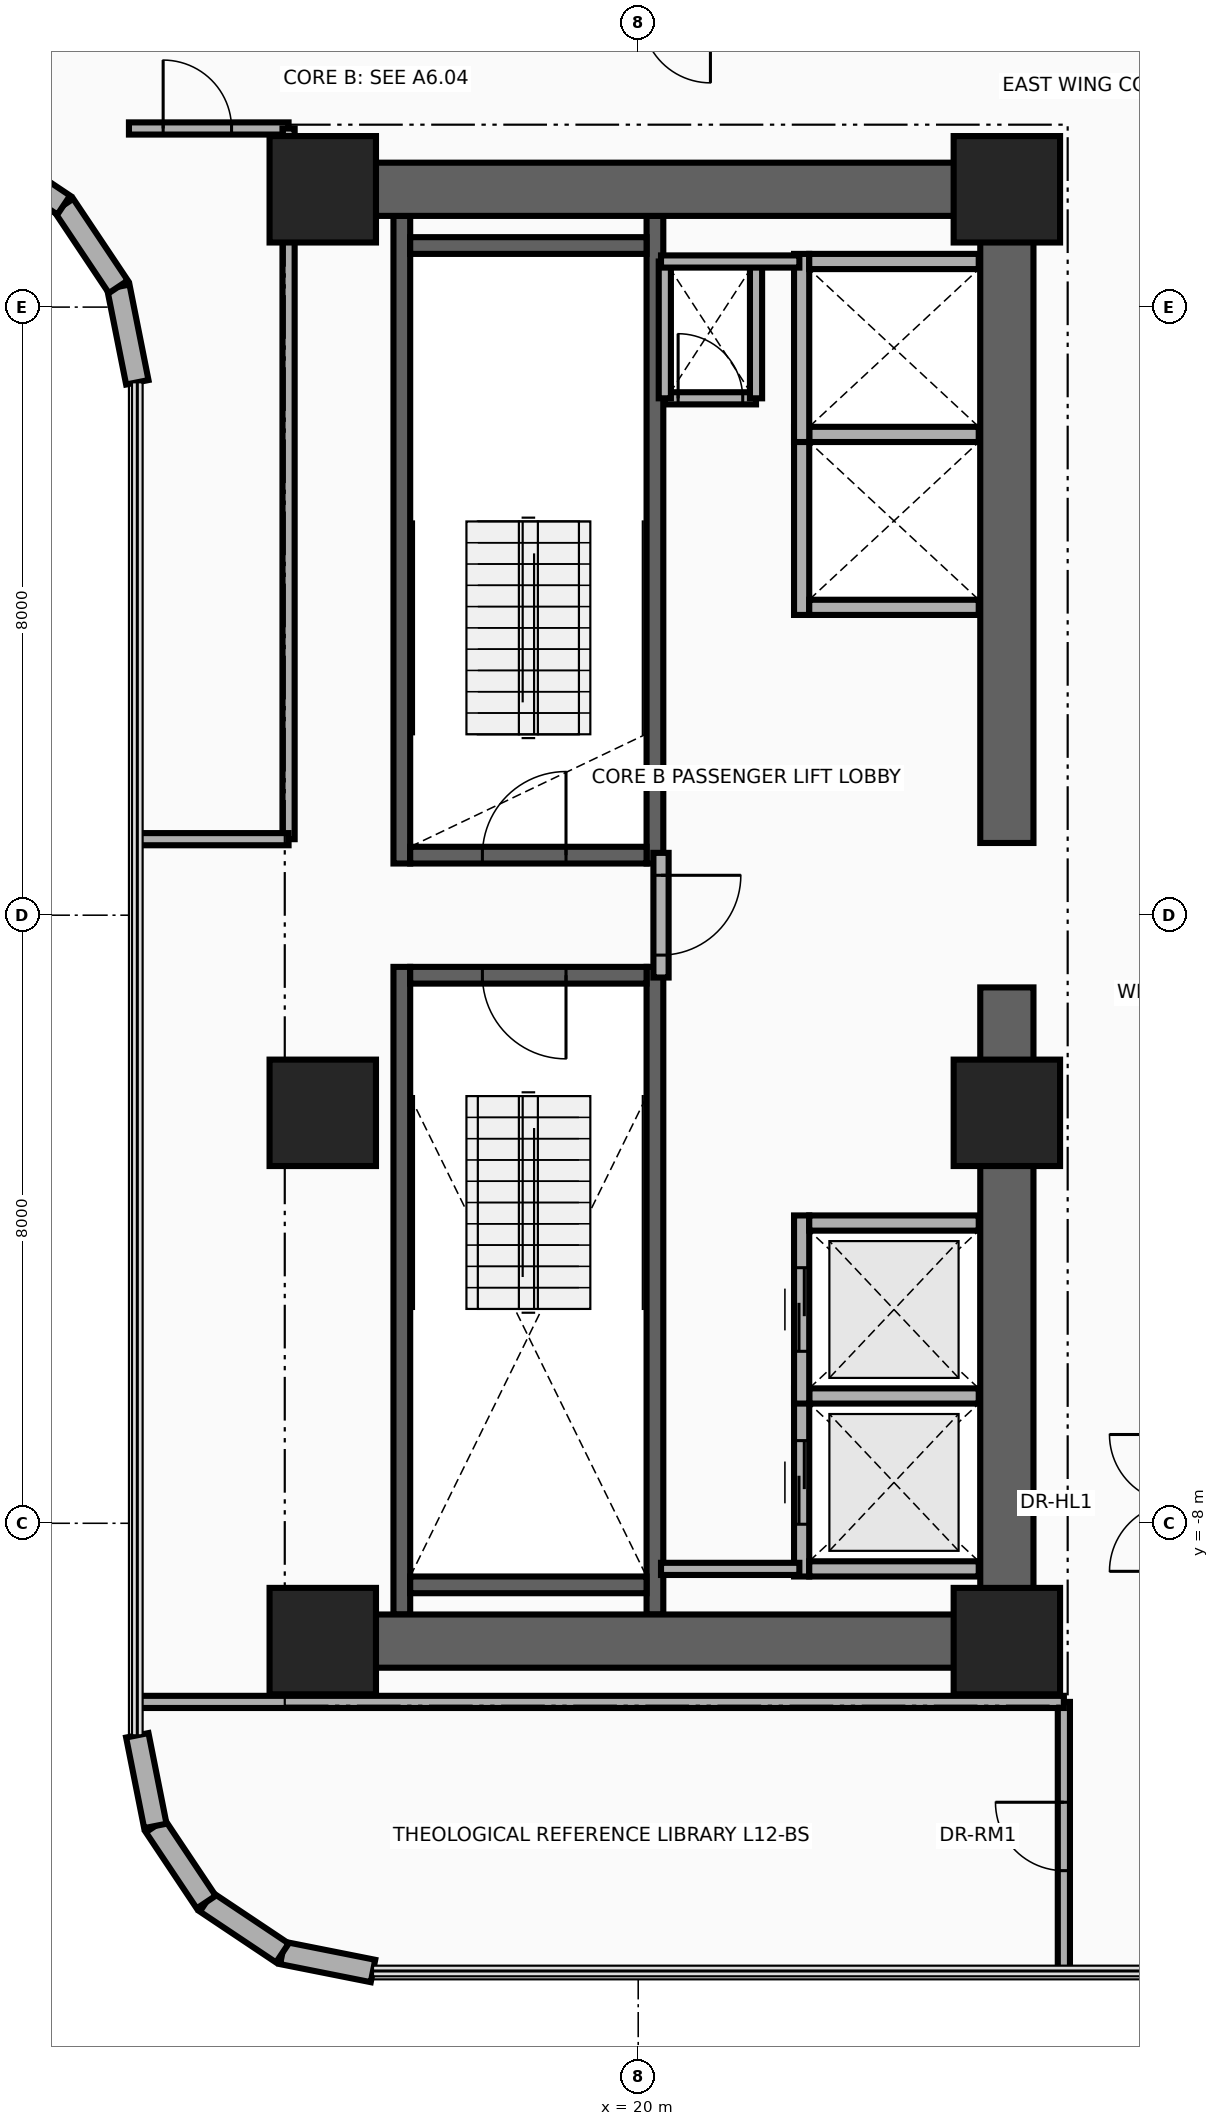
"""IFC4 building model, lengths in metres.
Left out: names, types, materials, properties, quantities, classifications, styles, units other than length and angle.
Written with IfcOpenShell. Run it as: python <this file> out.ifc"""

import sys

from ifc_helpers import new_model, si_unit, direction, frame, frame_2d, origin, origin_2d, place, context, subcontext, project, spatial, rectangle, extrude, source, transform, mapped, element, fill, save


model = new_model("IFC4")
c1 = context("Model", 3, precision=1e-05, world=origin(), true_north=direction((0.0, 1.0)))
c2 = subcontext(c1, "Body", "Model", "MODEL_VIEW")
j1 = project(units=[si_unit("LENGTHUNIT", "METRE"), si_unit("PLANEANGLEUNIT", "RADIAN")], contexts=[c1])
p1 = place(None, origin())
s1 = spatial("IfcSite", under=j1, at=p1, CompositionType="ELEMENT")
p2 = place(p1, origin())
s2 = spatial("IfcBuilding", under=s1, at=p2, CompositionType="ELEMENT")
p3 = place(p2, frame((0.0, 0.0, 51.9)))
s3 = spatial("IfcBuildingStorey", under=s2, at=p3, CompositionType="ELEMENT", Elevation=51.9)
for number, where, z_axis, x_axis in (
    (1, (16.89, 0.68, 0.0), (0.0, 0.0, 1.0), (0.0, 1.0, 0.0)),
    (2, (20.22, 0.68, 0.0), (0.0, 0.0, 1.0), (0.0, 1.0, 0.0)),
):
    element("IfcWall", number, at=place(p3, frame(where, z_axis=z_axis, x_axis=x_axis)), inside=s3, PredefinedType="SHEAR", context=c2, shape_type="SweptSolid", body=[
        extrude(rectangle(XDim=8.52, YDim=0.22, at=frame_2d((4.26, 0.0))), origin(), (0.0, 0.0, 1.0), 3.46),
    ])
p4 = place(p3, frame((17.0, 0.79, 0.0), z_axis=(0.0, 0.0, 1.0), x_axis=(1.0, 0.0, 0.0)))
e3 = element("IfcWall", 3, at=p4, inside=s3, PredefinedType="SHEAR", context=c2, shape_type="SweptSolid", body=[
    extrude(rectangle(XDim=3.11, YDim=0.22, at=frame_2d((1.555, 0.0))), origin(), (0.0, 0.0, 1.0), 3.46),
])
p5 = place(p4, frame((0.95, 0.0, 0.0)))
e4 = element("IfcOpeningElement", 4, at=p5, cuts=e3, PredefinedType="OPENING", context=c2, shape_type="SweptSolid", body=[
    extrude(rectangle(XDim=1.1, YDim=2.15, at=frame_2d((0.55, 1.075))), frame((0.0, 0.125, 0.0), z_axis=(0.0, -1.0, 0.0), x_axis=(1.0, 0.0, 0.0)), (0.0, 0.0, 1.0), 0.25),
])
p6 = place(p3, frame((17.0, 8.81, 0.0), z_axis=(0.0, 0.0, 1.0), x_axis=(1.0, 0.0, 0.0)))
e5 = element("IfcWall", 5, at=p6, inside=s3, PredefinedType="SHEAR", context=c2, shape_type="SweptSolid", body=[
    extrude(rectangle(XDim=3.11, YDim=0.22, at=frame_2d((1.555, 0.0))), origin(), (0.0, 0.0, 1.0), 3.46),
])
for number, where, z_axis, x_axis in (
    (6, (16.89, -9.2, 0.0), (0.0, 0.0, 1.0), (0.0, 1.0, 0.0)),
    (7, (20.22, -9.2, 0.0), (0.0, 0.0, 1.0), (0.0, 1.0, 0.0)),
):
    element("IfcWall", number, at=place(p3, frame(where, z_axis=z_axis, x_axis=x_axis)), inside=s3, PredefinedType="SHEAR", context=c2, shape_type="SweptSolid", body=[
        extrude(rectangle(XDim=8.52, YDim=0.22, at=frame_2d((4.26, 0.0))), origin(), (0.0, 0.0, 1.0), 3.46),
    ])
p7 = place(p3, frame((17.0, -8.81, 0.0), z_axis=(0.0, 0.0, 1.0), x_axis=(1.0, 0.0, 0.0)))
e8 = element("IfcWall", 8, at=p7, inside=s3, PredefinedType="SHEAR", context=c2, shape_type="SweptSolid", body=[
    extrude(rectangle(XDim=3.11, YDim=0.22, at=frame_2d((1.555, 0.0))), origin(), (0.0, 0.0, 1.0), 3.46),
])
p8 = place(p3, frame((17.0, -0.79, 0.0), z_axis=(0.0, 0.0, 1.0), x_axis=(1.0, 0.0, 0.0)))
e9 = element("IfcWall", 9, at=p8, inside=s3, PredefinedType="SHEAR", context=c2, shape_type="SweptSolid", body=[
    extrude(rectangle(XDim=3.11, YDim=0.22, at=frame_2d((1.555, 0.0))), origin(), (0.0, 0.0, 1.0), 3.46),
])
p9 = place(p8, frame((0.95, 0.0, 0.0)))
e10 = element("IfcOpeningElement", 10, at=p9, cuts=e9, PredefinedType="OPENING", context=c2, shape_type="SweptSolid", body=[
    extrude(rectangle(XDim=1.1, YDim=2.15, at=frame_2d((0.55, 1.075))), frame((0.0, 0.125, 0.0), z_axis=(0.0, -1.0, 0.0), x_axis=(1.0, 0.0, 0.0)), (0.0, 0.0, 1.0), 0.25),
])
for number, where, z_axis, x_axis in (
    (11, (24.85, -9.9, 0.0), (0.0, 0.0, 1.0), (0.0, 1.0, 0.0)),
    (12, (24.85, 0.95, 0.0), (0.0, 0.0, 1.0), (0.0, 1.0, 0.0)),
):
    element("IfcWall", number, at=place(p3, frame(where, z_axis=z_axis, x_axis=x_axis)), inside=s3, PredefinedType="SHEAR", context=c2, shape_type="SweptSolid", body=[
        extrude(rectangle(XDim=8.95, YDim=0.7, at=frame_2d((4.475, 0.0))), origin(), (0.0, 0.0, 1.0), 3.46),
    ])
for number, where, z_axis, x_axis in (
    (13, (15.85, 9.55, 0.0), (0.0, 0.0, 1.0), (1.0, 0.0, 0.0)),
    (14, (15.85, -9.55, 0.0), (0.0, 0.0, 1.0), (1.0, 0.0, 0.0)),
):
    element("IfcWall", number, at=place(p3, frame(where, z_axis=z_axis, x_axis=x_axis)), inside=s3, PredefinedType="SHEAR", context=c2, shape_type="SweptSolid", body=[
        extrude(rectangle(XDim=9.0, YDim=0.7, at=frame_2d((4.5, 0.0))), origin(), (0.0, 0.0, 1.0), 3.46),
    ])
m1 = source(origin(), c2, "Body", "SweptSolid", [
    extrude(rectangle(XDim=1.4, YDim=1.4, at=origin_2d()), origin(), (0.0, 0.0, 1.0), 3.7),
])
for number, where, z_axis, x_axis in (
    (15, (15.85, -9.55, 0.0), (0.0, 0.0, 1.0), (1.0, 0.0, 0.0)),
    (16, (24.85, -9.55, 0.0), (0.0, 0.0, 1.0), (1.0, 0.0, 0.0)),
    (17, (15.85, -2.6, 0.0), (0.0, 0.0, 1.0), (1.0, 0.0, 0.0)),
    (18, (24.85, -2.6, 0.0), (0.0, 0.0, 1.0), (1.0, 0.0, 0.0)),
    (19, (15.85, 9.55, 0.0), (0.0, 0.0, 1.0), (1.0, 0.0, 0.0)),
    (20, (24.85, 9.55, 0.0), (0.0, 0.0, 1.0), (1.0, 0.0, 0.0)),
):
    element("IfcColumn", number, at=place(p3, frame(where, z_axis=z_axis, x_axis=x_axis)), inside=s3, PredefinedType="COLUMN", context=c2, shape_type="MappedRepresentation", body=[
        mapped(m1, transform((0.0, 0.0, 0.0), x_axis=(1.0, 0.0, 0.0), y_axis=(0.0, 1.0, 0.0), z_axis=(0.0, 0.0, 1.0), scale=1.0)),
    ])
p10 = place(p3, frame((16.511, -13.89, 0.0), z_axis=(0.0, 0.0, 1.0), x_axis=(-0.980804027463, 0.194996050505, 0.0)))
e21 = element("IfcWall", 21, at=p10, inside=s3, PredefinedType="SOLIDWALL", context=c2, shape_type="SweptSolid", body=[
    extrude(rectangle(XDim=1.216, YDim=0.3, at=frame_2d((0.608, 0.0))), origin(), (0.0, 0.0, 1.0), 3.46),
])
for number, where, z_axis, x_axis in (
    (22, (15.318, -13.653, 0.0), (0.0, 0.0, 1.0), (-0.831, 0.556, 0.0)),
    (23, (14.317, -12.983, 0.0), (0.0, 0.0, 1.0), (-0.556, 0.831, 0.0)),
):
    element("IfcWall", number, at=place(p3, frame(where, z_axis=z_axis, x_axis=x_axis)), inside=s3, PredefinedType="SOLIDWALL", context=c2, shape_type="SweptSolid", body=[
        extrude(rectangle(XDim=1.205, YDim=0.3, at=frame_2d((0.603, 0.0))), origin(), (0.0, 0.0, 1.0), 3.46),
    ])
p11 = place(p3, frame((13.647, -11.982, 0.0), z_axis=(0.0, 0.0, 1.0), x_axis=(-0.195189223115, 0.980765602568, 0.0)))
e24 = element("IfcWall", 24, at=p11, inside=s3, PredefinedType="SOLIDWALL", context=c2, shape_type="SweptSolid", body=[
    extrude(rectangle(XDim=1.216, YDim=0.3, at=frame_2d((0.608, 0.0))), origin(), (0.0, 0.0, 1.0), 3.46),
])
p12 = place(p3, frame((13.41, 7.011, 0.0), z_axis=(0.0, 0.0, 1.0), x_axis=(-0.195090163074, 0.980785312019, 0.0)))
e25 = element("IfcWall", 25, at=p12, inside=s3, PredefinedType="SOLIDWALL", context=c2, shape_type="SweptSolid", body=[
    extrude(rectangle(XDim=1.281, YDim=0.3, at=frame_2d((0.641, 0.0))), origin(), (0.0, 0.0, 1.0), 3.46),
])
for number, where, z_axis, x_axis in (
    (26, (13.16, 8.268, 0.0), (0.0, 0.0, 1.0), (-0.556, 0.831, 0.0)),
    (27, (12.442, 9.342, 0.0), (0.0, 0.0, 1.0), (-0.831, 0.556, 0.0)),
):
    element("IfcWall", number, at=place(p3, frame(where, z_axis=z_axis, x_axis=x_axis)), inside=s3, PredefinedType="SOLIDWALL", context=c2, shape_type="SweptSolid", body=[
        extrude(rectangle(XDim=1.292, YDim=0.3, at=frame_2d((0.646, 0.0))), origin(), (0.0, 0.0, 1.0), 3.46),
    ])
p13 = place(p3, frame((22.15, -8.7, 0.0), z_axis=(0.0, 0.0, 1.0), x_axis=(0.0, 1.0, 0.0)))
e28 = element("IfcWall", 28, at=p13, inside=s3, PredefinedType="MOVABLE", context=c2, shape_type="SweptSolid", body=[
    extrude(rectangle(XDim=2.475, YDim=0.2, at=frame_2d((1.237, 0.0))), origin(), (0.0, 0.0, 1.0), 3.46),
])
p14 = place(p13, frame((0.688, 0.0, 0.0)))
e29 = element("IfcOpeningElement", 29, at=p14, cuts=e28, PredefinedType="OPENING", context=c2, shape_type="SweptSolid", body=[
    extrude(rectangle(XDim=1.1, YDim=2.1, at=frame_2d((0.55, 1.05))), frame((0.0, 0.115, 0.0), z_axis=(0.0, -1.0, 0.0), x_axis=(1.0, 0.0, 0.0)), (0.0, 0.0, 1.0), 0.23),
])
for number, where, z_axis, x_axis in (
    (30, (22.25, -8.6, 0.0), (0.0, 0.0, 1.0), (1.0, 0.0, 0.0)),
    (31, (22.25, -6.325, 0.0), (0.0, 0.0, 1.0), (1.0, 0.0, 0.0)),
):
    element("IfcWall", number, at=place(p3, frame(where, z_axis=z_axis, x_axis=x_axis)), inside=s3, PredefinedType="MOVABLE", context=c2, shape_type="SweptSolid", body=[
        extrude(rectangle(XDim=2.23, YDim=0.2, at=frame_2d((1.115, 0.0))), origin(), (0.0, 0.0, 1.0), 3.46),
    ])
p15 = place(p3, frame((22.15, -6.425, 0.0), z_axis=(0.0, 0.0, 1.0), x_axis=(0.0, 1.0, 0.0)))
e32 = element("IfcWall", 32, at=p15, inside=s3, PredefinedType="MOVABLE", context=c2, shape_type="SweptSolid", body=[
    extrude(rectangle(XDim=2.475, YDim=0.2, at=frame_2d((1.238, 0.0))), origin(), (0.0, 0.0, 1.0), 3.46),
])
p16 = place(p15, frame((0.688, 0.0, 0.0)))
e33 = element("IfcOpeningElement", 33, at=p16, cuts=e32, PredefinedType="OPENING", context=c2, shape_type="SweptSolid", body=[
    extrude(rectangle(XDim=1.1, YDim=2.1, at=frame_2d((0.55, 1.05))), frame((0.0, 0.115, 0.0), z_axis=(0.0, -1.0, 0.0), x_axis=(1.0, 0.0, 0.0)), (0.0, 0.0, 1.0), 0.23),
])
p17 = place(p3, frame((22.25, -4.05, 0.0), z_axis=(0.0, 0.0, 1.0), x_axis=(1.0, 0.0, 0.0)))
e34 = element("IfcWall", 34, at=p17, inside=s3, PredefinedType="MOVABLE", context=c2, shape_type="SweptSolid", body=[
    extrude(rectangle(XDim=2.23, YDim=0.2, at=frame_2d((1.115, 0.0))), origin(), (0.0, 0.0, 1.0), 3.46),
])
p18 = place(p3, frame((22.15, 3.95, 0.0), z_axis=(0.0, 0.0, 1.0), x_axis=(0.0, 1.0, 0.0)))
e35 = element("IfcWall", 35, at=p18, inside=s3, PredefinedType="MOVABLE", context=c2, shape_type="SweptSolid", body=[
    extrude(rectangle(XDim=2.475, YDim=0.2, at=frame_2d((1.238, 0.0))), origin(), (0.0, 0.0, 1.0), 3.46),
])
for number, where, z_axis, x_axis in (
    (36, (22.25, 4.05, 0.0), (0.0, 0.0, 1.0), (1.0, 0.0, 0.0)),
    (37, (22.25, 6.325, 0.0), (0.0, 0.0, 1.0), (1.0, 0.0, 0.0)),
):
    element("IfcWall", number, at=place(p3, frame(where, z_axis=z_axis, x_axis=x_axis)), inside=s3, PredefinedType="MOVABLE", context=c2, shape_type="SweptSolid", body=[
        extrude(rectangle(XDim=2.23, YDim=0.2, at=frame_2d((1.115, 0.0))), origin(), (0.0, 0.0, 1.0), 2.245),
    ])
p19 = place(p3, frame((22.15, 6.225, 0.0), z_axis=(0.0, 0.0, 1.0), x_axis=(0.0, 1.0, 0.0)))
e38 = element("IfcWall", 38, at=p19, inside=s3, PredefinedType="MOVABLE", context=c2, shape_type="SweptSolid", body=[
    extrude(rectangle(XDim=2.475, YDim=0.2, at=frame_2d((1.237, 0.0))), origin(), (0.0, 0.0, 1.0), 3.46),
])
p20 = place(p3, frame((22.25, 8.6, 0.0), z_axis=(0.0, 0.0, 1.0), x_axis=(1.0, 0.0, 0.0)))
e39 = element("IfcWall", 39, at=p20, inside=s3, PredefinedType="MOVABLE", context=c2, shape_type="SweptSolid", body=[
    extrude(rectangle(XDim=2.23, YDim=0.2, at=frame_2d((1.115, 0.0))), origin(), (0.0, 0.0, 1.0), 2.245),
])
p21 = place(p3, frame((20.3, -0.82, 0.0), z_axis=(0.0, 0.0, 1.0), x_axis=(0.0, 1.0, 0.0)))
e40 = element("IfcWall", 40, at=p21, inside=s3, PredefinedType="PARTITIONING", context=c2, shape_type="SweptSolid", body=[
    extrude(rectangle(XDim=1.64, YDim=0.2, at=frame_2d((0.82, 0.0))), origin(), (0.0, 0.0, 1.0), 3.46),
])
p22 = place(p21, frame((0.295, 0.0, 0.0)))
e41 = element("IfcOpeningElement", 41, at=p22, cuts=e40, PredefinedType="OPENING", context=c2, shape_type="SweptSolid", body=[
    extrude(rectangle(XDim=1.05, YDim=2.15, at=frame_2d((0.525, 1.075))), frame((0.0, 0.115, 0.0), z_axis=(0.0, -1.0, 0.0), x_axis=(1.0, 0.0, 0.0)), (0.0, 0.0, 1.0), 0.23),
])
p23 = place(p3, frame((20.35, 6.8, 0.0), z_axis=(0.0, 0.0, 1.0), x_axis=(1.0, 0.0, 0.0)))
e42 = element("IfcWall", 42, at=p23, inside=s3, PredefinedType="PARTITIONING", context=c2, shape_type="SweptSolid", body=[
    extrude(rectangle(XDim=1.2, YDim=0.16, at=frame_2d((0.6, 0.0))), origin(), (0.0, 0.0, 1.0), 3.46),
])
p24 = place(p23, frame((0.175, 0.0, 0.0)))
e43 = element("IfcOpeningElement", 43, at=p24, cuts=e42, PredefinedType="OPENING", context=c2, shape_type="SweptSolid", body=[
    extrude(rectangle(XDim=0.85, YDim=2.05, at=frame_2d((0.425, 1.025))), frame((0.0, 0.095, 0.0), z_axis=(0.0, -1.0, 0.0), x_axis=(1.0, 0.0, 0.0)), (0.0, 0.0, 1.0), 0.19),
])
for number, where, z_axis, x_axis in (
    (44, (21.55, 6.8, 0.0), (0.0, 0.0, 1.0), (0.0, 1.0, 0.0)),
    (45, (20.35, 6.8, 0.0), (0.0, 0.0, 1.0), (0.0, 1.0, 0.0)),
):
    element("IfcWall", number, at=place(p3, frame(where, z_axis=z_axis, x_axis=x_axis)), inside=s3, PredefinedType="PARTITIONING", context=c2, shape_type="SweptSolid", body=[
        extrude(rectangle(XDim=1.8, YDim=0.16, at=frame_2d((0.9, 0.0))), origin(), (0.0, 0.0, 1.0), 3.46),
    ])
for number, where, z_axis, x_axis in (
    (46, (20.3, -8.6, 0.0), (0.0, 0.0, 1.0), (1.0, 0.0, 0.0)),
    (47, (20.3, 8.6, 0.0), (0.0, 0.0, 1.0), (1.0, 0.0, 0.0)),
):
    element("IfcWall", number, at=place(p3, frame(where, z_axis=z_axis, x_axis=x_axis)), inside=s3, PredefinedType="PARTITIONING", context=c2, shape_type="SweptSolid", body=[
        extrude(rectangle(XDim=1.82, YDim=0.16, at=frame_2d((0.91, 0.0))), origin(), (0.0, 0.0, 1.0), 3.46),
    ])
p25 = place(p3, frame((25.6, -13.89, 0.0), z_axis=(0.0, 0.0, 1.0), x_axis=(0.0, 1.0, 0.0)))
e48 = element("IfcWall", 48, at=p25, inside=s3, PredefinedType="PARTITIONING", context=c2, shape_type="SweptSolid", body=[
    extrude(rectangle(XDim=3.54, YDim=0.16, at=frame_2d((1.77, 0.0))), origin(), (0.0, 0.0, 1.0), 3.46),
])
p26 = place(p25, frame((1.32, 0.0, 0.0)))
e49 = element("IfcOpeningElement", 49, at=p26, cuts=e48, PredefinedType="OPENING", context=c2, shape_type="SweptSolid", body=[
    extrude(rectangle(XDim=0.9, YDim=2.1, at=frame_2d((0.45, 1.05))), frame((0.0, 0.095, 0.0), z_axis=(0.0, -1.0, 0.0), x_axis=(1.0, 0.0, 0.0)), (0.0, 0.0, 1.0), 0.19),
])
p27 = place(p3, frame((13.41, -10.35, 0.0), z_axis=(0.0, 0.0, 1.0), x_axis=(1.0, 0.0, 0.0)))
e50 = element("IfcWall", 50, at=p27, inside=s3, PredefinedType="PARTITIONING", context=c2, shape_type="SweptSolid", body=[
    extrude(rectangle(XDim=12.19, YDim=0.16, at=frame_2d((6.095, 0.0))), origin(), (0.0, 0.0, 1.0), 3.46),
])
p28 = place(p3, frame((13.3, 10.35, 0.0), z_axis=(0.0, 0.0, 1.0), x_axis=(1.0, 0.0, 0.0)))
e51 = element("IfcWall", 51, at=p28, inside=s3, PredefinedType="PARTITIONING", context=c2, shape_type="SweptSolid", body=[
    extrude(rectangle(XDim=2.1, YDim=0.16, at=frame_2d((1.05, 0.0))), origin(), (0.0, 0.0, 1.0), 2.583),
])
p29 = place(p28, frame((0.45, 0.0, 0.0)))
e52 = element("IfcOpeningElement", 52, at=p29, cuts=e51, PredefinedType="OPENING", context=c2, shape_type="SweptSolid", body=[
    extrude(rectangle(XDim=0.9, YDim=2.1, at=frame_2d((0.45, 1.05))), frame((0.0, 0.095, 0.0), z_axis=(0.0, -1.0, 0.0), x_axis=(1.0, 0.0, 0.0)), (0.0, 0.0, 1.0), 0.19),
])
p30 = place(p3, frame((15.4, 1.0, 0.0), z_axis=(0.0, 0.0, 1.0), x_axis=(0.0, 1.0, 0.0)))
e53 = element("IfcWall", 53, at=p30, inside=s3, PredefinedType="PARTITIONING", context=c2, shape_type="SweptSolid", body=[
    extrude(rectangle(XDim=9.35, YDim=0.16, at=frame_2d((4.675, 0.0))), origin(), (0.0, 0.0, 1.0), 2.245),
])
p31 = place(p3, frame((13.41, 1.0, 0.0), z_axis=(0.0, 0.0, 1.0), x_axis=(1.0, 0.0, 0.0)))
e54 = element("IfcWall", 54, at=p31, inside=s3, PredefinedType="PARTITIONING", context=c2, shape_type="SweptSolid", body=[
    extrude(rectangle(XDim=1.99, YDim=0.16, at=frame_2d((0.995, 0.0))), origin(), (0.0, 0.0, 1.0), 2.245),
])
p32 = place(p14, origin())
e55 = element("IfcDoor", 55, at=p32, inside=s3, OperationType="DOUBLE_DOOR_SLIDING", PredefinedType="DOOR", context=c2, shape_type="SweptSolid", body=[
    extrude(rectangle(XDim=1.1, YDim=2.1, at=frame_2d((0.55, 1.05))), frame((0.0, 0.025, 0.0), z_axis=(0.0, -1.0, 0.0), x_axis=(1.0, 0.0, 0.0)), (0.0, 0.0, 1.0), 0.05),
])
fill(e29, e55)
p33 = place(p16, origin())
e56 = element("IfcDoor", 56, at=p33, inside=s3, OperationType="DOUBLE_DOOR_SLIDING", PredefinedType="DOOR", context=c2, shape_type="SweptSolid", body=[
    extrude(rectangle(XDim=1.1, YDim=2.1, at=frame_2d((0.55, 1.05))), frame((0.0, 0.025, 0.0), z_axis=(0.0, -1.0, 0.0), x_axis=(1.0, 0.0, 0.0)), (0.0, 0.0, 1.0), 0.05),
])
fill(e33, e56)
p34 = place(p22, frame((1.05, 0.0, 0.0), z_axis=(0.0, 0.0, 1.0), x_axis=(-1.0, 0.0, 0.0)))
e57 = element("IfcDoor", 57, at=p34, inside=s3, OperationType="SINGLE_SWING_LEFT", PredefinedType="DOOR", context=c2, shape_type="SweptSolid", body=[
    extrude(rectangle(XDim=1.05, YDim=2.15, at=frame_2d((0.525, 1.075))), frame((0.0, 0.025, 0.0), z_axis=(0.0, -1.0, 0.0), x_axis=(1.0, 0.0, 0.0)), (0.0, 0.0, 1.0), 0.05),
])
fill(e41, e57)
p35 = place(p5, origin())
e58 = element("IfcDoor", 58, at=p35, inside=s3, OperationType="SINGLE_SWING_RIGHT", PredefinedType="DOOR", context=c2, shape_type="SweptSolid", body=[
    extrude(rectangle(XDim=1.1, YDim=2.15, at=frame_2d((0.55, 1.075))), frame((0.0, 0.025, 0.0), z_axis=(0.0, -1.0, 0.0), x_axis=(1.0, 0.0, 0.0)), (0.0, 0.0, 1.0), 0.05),
])
fill(e4, e58)
p36 = place(p9, frame((1.1, 0.0, 0.0), z_axis=(0.0, 0.0, 1.0), x_axis=(-1.0, 0.0, 0.0)))
e59 = element("IfcDoor", 59, at=p36, inside=s3, OperationType="SINGLE_SWING_LEFT", PredefinedType="DOOR", context=c2, shape_type="SweptSolid", body=[
    extrude(rectangle(XDim=1.1, YDim=2.15, at=frame_2d((0.55, 1.075))), frame((0.0, 0.025, 0.0), z_axis=(0.0, -1.0, 0.0), x_axis=(1.0, 0.0, 0.0)), (0.0, 0.0, 1.0), 0.05),
])
fill(e10, e59)
p37 = place(p24, origin())
e60 = element("IfcDoor", 60, at=p37, inside=s3, OperationType="SINGLE_SWING_RIGHT", PredefinedType="DOOR", context=c2, shape_type="SweptSolid", body=[
    extrude(rectangle(XDim=0.85, YDim=2.05, at=frame_2d((0.425, 1.025))), frame((0.0, 0.025, 0.0), z_axis=(0.0, -1.0, 0.0), x_axis=(1.0, 0.0, 0.0)), (0.0, 0.0, 1.0), 0.05),
])
fill(e43, e60)
p38 = place(p26, origin())
e61 = element("IfcDoor", 61, at=p38, inside=s3, OperationType="SINGLE_SWING_RIGHT", PredefinedType="DOOR", context=c2, shape_type="SweptSolid", body=[
    extrude(rectangle(XDim=0.9, YDim=2.1, at=frame_2d((0.45, 1.05))), frame((0.0, 0.025, 0.0), z_axis=(0.0, -1.0, 0.0), x_axis=(1.0, 0.0, 0.0)), (0.0, 0.0, 1.0), 0.05),
])
fill(e49, e61)
p39 = place(p29, origin())
e62 = element("IfcDoor", 62, at=p39, inside=s3, OperationType="SINGLE_SWING_RIGHT", PredefinedType="DOOR", context=c2, shape_type="SweptSolid", body=[
    extrude(rectangle(XDim=0.9, YDim=2.1, at=frame_2d((0.45, 1.05))), frame((0.0, 0.025, 0.0), z_axis=(0.0, -1.0, 0.0), x_axis=(1.0, 0.0, 0.0)), (0.0, 0.0, 1.0), 0.05),
])
fill(e52, e62)
save(model, sys.argv[1])
